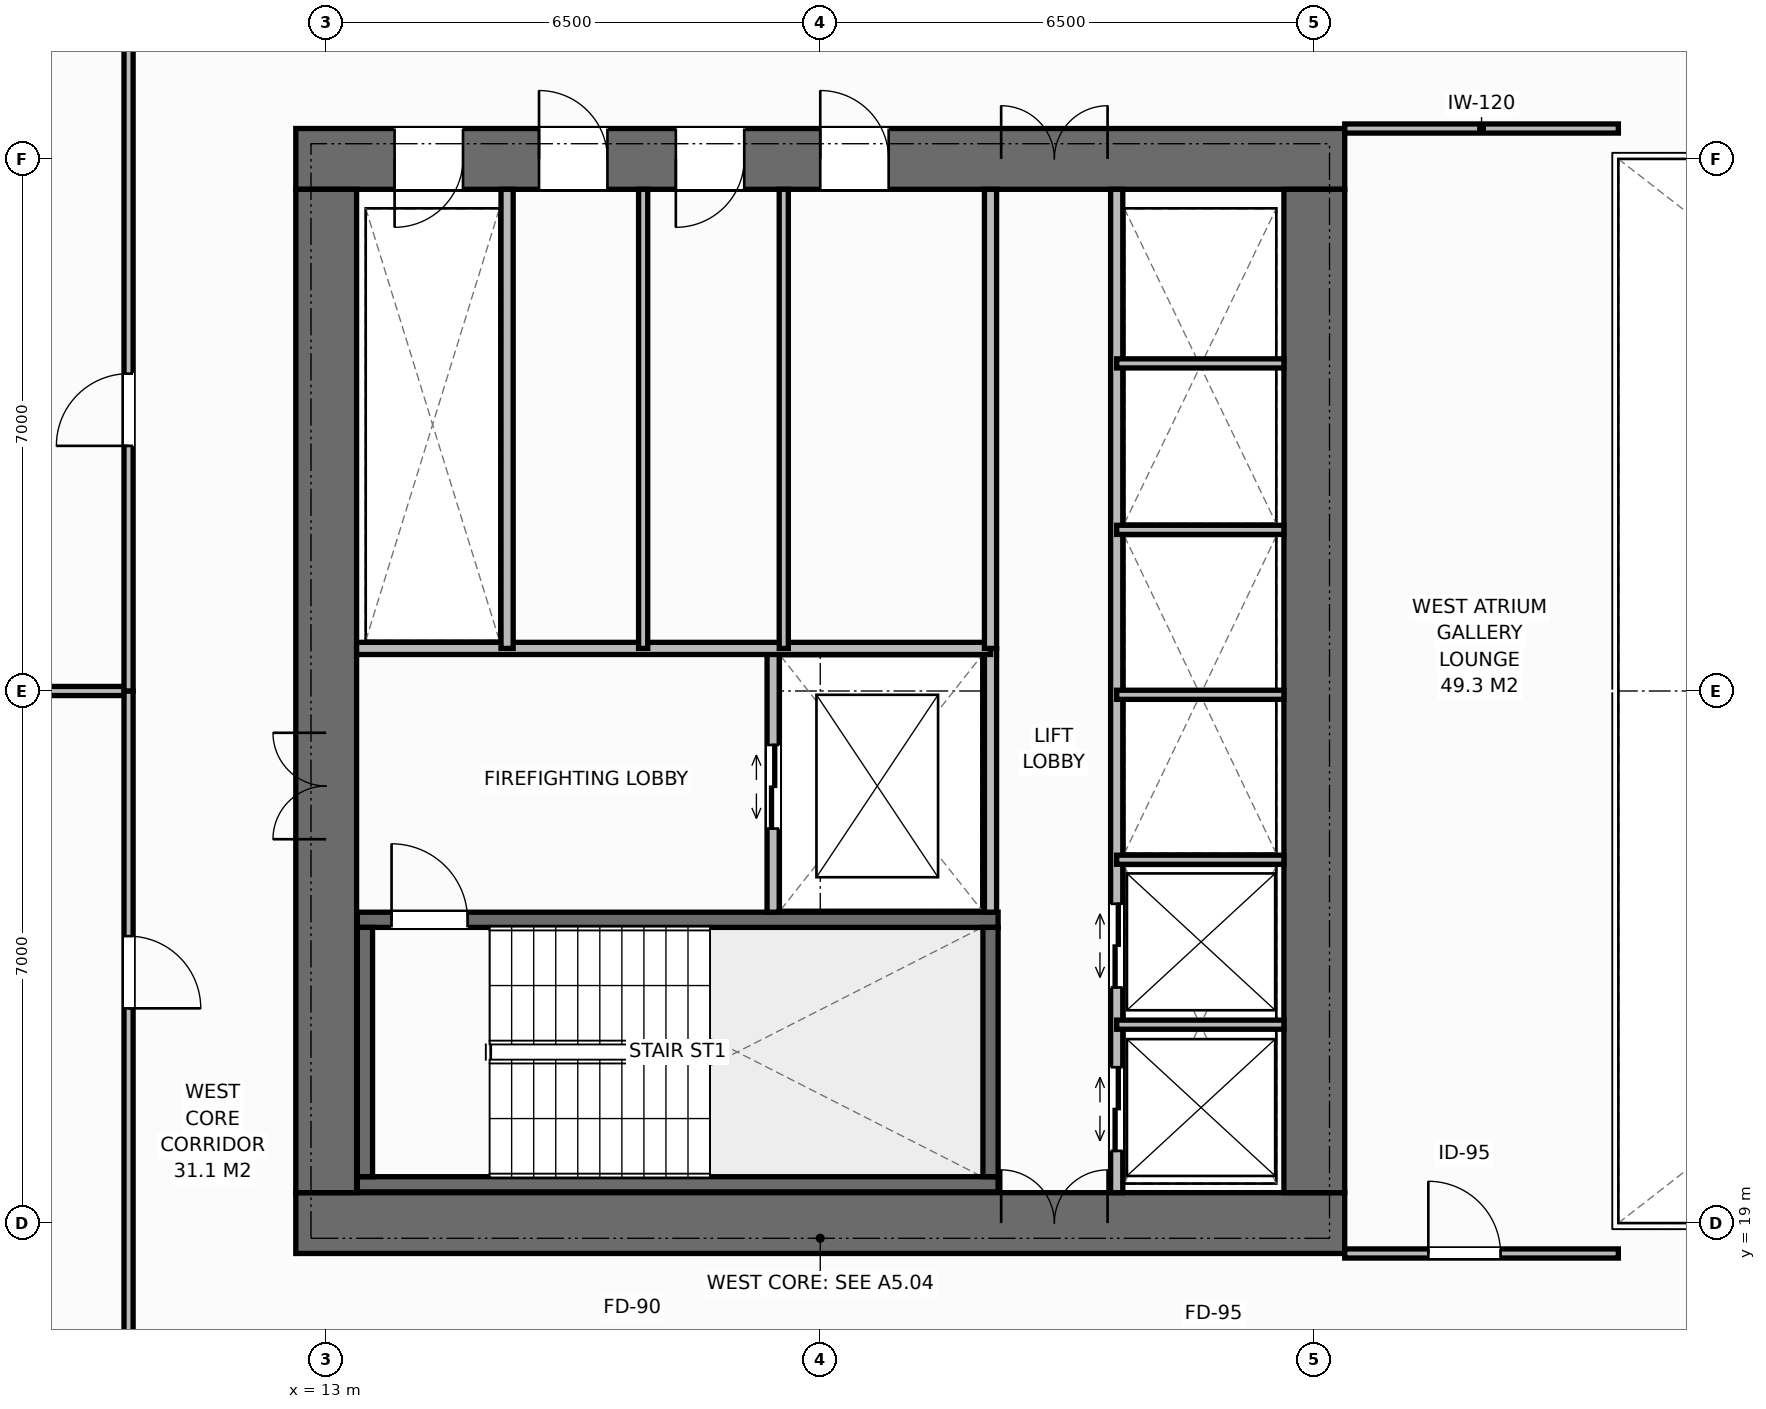
"""IFC4 building model, lengths in metres.
Left out: names, types, materials, properties, quantities, classifications, styles, units other than length and angle.
Written with IfcOpenShell. Run it as: python <this file> out.ifc"""

import sys

from ifc_helpers import new_model, si_unit, direction, frame, frame_2d, origin, place, context, subcontext, project, spatial, rectangle, extrude, element, fill, save


model = new_model("IFC4")
c1 = context("Model", 3, precision=1e-05, world=origin(), true_north=direction((0.0, 1.0)))
c2 = subcontext(c1, "Body", "Model", "MODEL_VIEW")
j1 = project(units=[si_unit("LENGTHUNIT", "METRE"), si_unit("PLANEANGLEUNIT", "RADIAN")], contexts=[c1])
p1 = place(None, origin())
s1 = spatial("IfcSite", under=j1, at=p1, CompositionType="ELEMENT")
p2 = place(p1, origin())
s2 = spatial("IfcBuilding", under=s1, at=p2, CompositionType="ELEMENT")
p3 = place(p2, frame((0.0, 0.0, 46.8)))
s3 = spatial("IfcBuildingStorey", under=s2, at=p3, CompositionType="ELEMENT", Elevation=46.8)
p4 = place(p3, frame((12.6, 19.0, 0.0), z_axis=(0.0, 0.0, 1.0), x_axis=(1.0, 0.0, 0.0)))
e1 = element("IfcWall", 1, at=p4, inside=s3, PredefinedType="SHEAR", context=c2, shape_type="SweptSolid", body=[
    extrude(rectangle(XDim=13.8, YDim=0.8, at=frame_2d((6.9, 0.0))), origin(), (0.0, 0.0, 1.0), 3.8),
])
p5 = place(p4, frame((9.28, 0.0, 0.0)))
e2 = element("IfcOpeningElement", 2, at=p5, cuts=e1, PredefinedType="OPENING", context=c2, shape_type="SweptSolid", body=[
    extrude(rectangle(XDim=1.4, YDim=2.2, at=frame_2d((0.7, 1.1))), frame((0.0, 0.41, 0.0), z_axis=(0.0, -1.0, 0.0), x_axis=(1.0, 0.0, 0.0)), (0.0, 0.0, 1.0), 0.82),
])
p6 = place(p3, frame((12.6, 33.0, 0.0), z_axis=(0.0, 0.0, 1.0), x_axis=(1.0, 0.0, 0.0)))
e3 = element("IfcWall", 3, at=p6, inside=s3, PredefinedType="SHEAR", context=c2, shape_type="SweptSolid", body=[
    extrude(rectangle(XDim=13.8, YDim=0.8, at=frame_2d((6.9, 0.0))), origin(), (0.0, 0.0, 1.0), 3.8),
])
p7 = place(p6, frame((1.3, 0.0, 0.0)))
e4 = element("IfcOpeningElement", 4, at=p7, cuts=e3, PredefinedType="OPENING", context=c2, shape_type="SweptSolid", body=[
    extrude(rectangle(XDim=0.9, YDim=2.15, at=frame_2d((0.45, 1.075))), frame((0.0, 0.41, 0.0), z_axis=(0.0, -1.0, 0.0), x_axis=(1.0, 0.0, 0.0)), (0.0, 0.0, 1.0), 0.82),
])
p8 = place(p6, frame((3.2, 0.0, 0.0)))
e5 = element("IfcOpeningElement", 5, at=p8, cuts=e3, PredefinedType="OPENING", context=c2, shape_type="SweptSolid", body=[
    extrude(rectangle(XDim=0.9, YDim=2.15, at=frame_2d((0.45, 1.075))), frame((0.0, 0.41, 0.0), z_axis=(0.0, -1.0, 0.0), x_axis=(1.0, 0.0, 0.0)), (0.0, 0.0, 1.0), 0.82),
])
p9 = place(p6, frame((5.0, 0.0, 0.0)))
e6 = element("IfcOpeningElement", 6, at=p9, cuts=e3, PredefinedType="OPENING", context=c2, shape_type="SweptSolid", body=[
    extrude(rectangle(XDim=0.9, YDim=2.15, at=frame_2d((0.45, 1.075))), frame((0.0, 0.41, 0.0), z_axis=(0.0, -1.0, 0.0), x_axis=(1.0, 0.0, 0.0)), (0.0, 0.0, 1.0), 0.82),
])
p10 = place(p6, frame((6.9, 0.0, 0.0)))
e7 = element("IfcOpeningElement", 7, at=p10, cuts=e3, PredefinedType="OPENING", context=c2, shape_type="SweptSolid", body=[
    extrude(rectangle(XDim=0.9, YDim=2.15, at=frame_2d((0.45, 1.075))), frame((0.0, 0.41, 0.0), z_axis=(0.0, -1.0, 0.0), x_axis=(1.0, 0.0, 0.0)), (0.0, 0.0, 1.0), 0.82),
])
p11 = place(p6, frame((9.28, 0.0, 0.0)))
e8 = element("IfcOpeningElement", 8, at=p11, cuts=e3, PredefinedType="OPENING", context=c2, shape_type="SweptSolid", body=[
    extrude(rectangle(XDim=1.4, YDim=2.2, at=frame_2d((0.7, 1.1))), frame((0.0, 0.41, 0.0), z_axis=(0.0, -1.0, 0.0), x_axis=(1.0, 0.0, 0.0)), (0.0, 0.0, 1.0), 0.82),
])
p12 = place(p3, frame((13.0, 19.4, 0.0), z_axis=(0.0, 0.0, 1.0), x_axis=(0.0, 1.0, 0.0)))
e9 = element("IfcWall", 9, at=p12, inside=s3, PredefinedType="SHEAR", context=c2, shape_type="SweptSolid", body=[
    extrude(rectangle(XDim=13.2, YDim=0.8, at=frame_2d((6.6, 0.0))), origin(), (0.0, 0.0, 1.0), 3.8),
])
p13 = place(p12, frame((4.65, 0.0, 0.0)))
e10 = element("IfcOpeningElement", 10, at=p13, cuts=e9, PredefinedType="OPENING", context=c2, shape_type="SweptSolid", body=[
    extrude(rectangle(XDim=1.4, YDim=2.2, at=frame_2d((0.7, 1.1))), frame((0.0, 0.41, 0.0), z_axis=(0.0, -1.0, 0.0), x_axis=(1.0, 0.0, 0.0)), (0.0, 0.0, 1.0), 0.82),
])
p14 = place(p3, frame((26.0, 19.4, 0.0), z_axis=(0.0, 0.0, 1.0), x_axis=(0.0, 1.0, 0.0)))
e11 = element("IfcWall", 11, at=p14, inside=s3, PredefinedType="SHEAR", context=c2, shape_type="SweptSolid", body=[
    extrude(rectangle(XDim=13.2, YDim=0.8, at=frame_2d((6.6, 0.0))), origin(), (0.0, 0.0, 1.0), 3.8),
])
p15 = place(p3, frame((13.41, 19.51, 0.0), z_axis=(0.0, 0.0, 1.0), x_axis=(1.0, 0.0, 0.0)))
e12 = element("IfcWall", 12, at=p15, inside=s3, PredefinedType="SHEAR", context=c2, shape_type="SweptSolid", body=[
    extrude(rectangle(XDim=8.43, YDim=0.2, at=frame_2d((4.215, 0.0))), origin(), (0.0, 0.0, 1.0), 3.8),
])
p16 = place(p3, frame((13.41, 22.99, 0.0), z_axis=(0.0, 0.0, 1.0), x_axis=(1.0, 0.0, 0.0)))
e13 = element("IfcWall", 13, at=p16, inside=s3, PredefinedType="SHEAR", context=c2, shape_type="SweptSolid", body=[
    extrude(rectangle(XDim=8.43, YDim=0.2, at=frame_2d((4.215, 0.0))), origin(), (0.0, 0.0, 1.0), 3.8),
])
p17 = place(p16, frame((0.45, 0.0, 0.0)))
e14 = element("IfcOpeningElement", 14, at=p17, cuts=e13, PredefinedType="OPENING", context=c2, shape_type="SweptSolid", body=[
    extrude(rectangle(XDim=1.0, YDim=2.15, at=frame_2d((0.5, 1.075))), frame((0.0, 0.11, 0.0), z_axis=(0.0, -1.0, 0.0), x_axis=(1.0, 0.0, 0.0)), (0.0, 0.0, 1.0), 0.22),
])
for number, where, z_axis, x_axis in (
    (15, (13.51, 19.61, 0.0), (0.0, 0.0, 1.0), (0.0, 1.0, 0.0)),
    (16, (21.74, 19.61, 0.0), (0.0, 0.0, 1.0), (0.0, 1.0, 0.0)),
):
    element("IfcWall", number, at=place(p3, frame(where, z_axis=z_axis, x_axis=x_axis)), inside=s3, PredefinedType="SHEAR", context=c2, shape_type="SweptSolid", body=[
        extrude(rectangle(XDim=3.28, YDim=0.2, at=frame_2d((1.64, 0.0))), origin(), (0.0, 0.0, 1.0), 3.8),
    ])
p18 = place(p3, frame((21.74, 23.09, 0.0), z_axis=(0.0, 0.0, 1.0), x_axis=(0.0, 1.0, 0.0)))
e17 = element("IfcWall", 17, at=p18, inside=s3, PredefinedType="STANDARD", context=c2, shape_type="SweptSolid", body=[
    extrude(rectangle(XDim=3.47, YDim=0.16, at=frame_2d((1.735, 0.0))), origin(), (0.0, 0.0, 1.0), 3.55),
])
p19 = place(p3, frame((18.88, 23.09, 0.0), z_axis=(0.0, 0.0, 1.0), x_axis=(0.0, 1.0, 0.0)))
e18 = element("IfcWall", 18, at=p19, inside=s3, PredefinedType="STANDARD", context=c2, shape_type="SweptSolid", body=[
    extrude(rectangle(XDim=3.47, YDim=0.16, at=frame_2d((1.735, 0.0))), origin(), (0.0, 0.0, 1.0), 3.55),
])
p20 = place(p19, frame((1.1, 0.0, 0.0)))
e19 = element("IfcOpeningElement", 19, at=p20, cuts=e18, PredefinedType="OPENING", context=c2, shape_type="SweptSolid", body=[
    extrude(rectangle(XDim=1.1, YDim=2.2, at=frame_2d((0.55, 1.1))), frame((0.0, 0.09, 0.0), z_axis=(0.0, -1.0, 0.0), x_axis=(1.0, 0.0, 0.0)), (0.0, 0.0, 1.0), 0.18),
])
p21 = place(p3, frame((13.4, 26.56, 0.0), z_axis=(0.0, 0.0, 1.0), x_axis=(1.0, 0.0, 0.0)))
e20 = element("IfcWall", 20, at=p21, inside=s3, PredefinedType="STANDARD", context=c2, shape_type="SweptSolid", body=[
    extrude(rectangle(XDim=8.34, YDim=0.16, at=frame_2d((4.17, 0.0))), origin(), (0.0, 0.0, 1.0), 3.55),
])
p22 = place(p3, frame((15.38, 26.56, 0.0), z_axis=(0.0, 0.0, 1.0), x_axis=(0.0, 1.0, 0.0)))
e21 = element("IfcWall", 21, at=p22, inside=s3, PredefinedType="STANDARD", context=c2, shape_type="SweptSolid", body=[
    extrude(rectangle(XDim=6.04, YDim=0.16, at=frame_2d((3.02, 0.0))), origin(), (0.0, 0.0, 1.0), 3.55),
])
for number, where, z_axis, x_axis in (
    (22, (17.17, 26.56, 0.0), (0.0, 0.0, 1.0), (0.0, 1.0, 0.0)),
    (23, (19.02, 26.56, 0.0), (0.0, 0.0, 1.0), (0.0, 1.0, 0.0)),
):
    element("IfcWall", number, at=place(p3, frame(where, z_axis=z_axis, x_axis=x_axis)), inside=s3, PredefinedType="PARTITIONING", context=c2, shape_type="SweptSolid", body=[
        extrude(rectangle(XDim=6.04, YDim=0.12, at=frame_2d((3.02, 0.0))), origin(), (0.0, 0.0, 1.0), 3.55),
    ])
p23 = place(p3, frame((21.74, 26.56, 0.0), z_axis=(0.0, 0.0, 1.0), x_axis=(0.0, 1.0, 0.0)))
e24 = element("IfcWall", 24, at=p23, inside=s3, PredefinedType="STANDARD", context=c2, shape_type="SweptSolid", body=[
    extrude(rectangle(XDim=6.04, YDim=0.16, at=frame_2d((3.02, 0.0))), origin(), (0.0, 0.0, 1.0), 3.55),
])
p24 = place(p3, frame((23.4, 19.4, 0.0), z_axis=(0.0, 0.0, 1.0), x_axis=(0.0, 1.0, 0.0)))
e25 = element("IfcWall", 25, at=p24, inside=s3, PredefinedType="STANDARD", context=c2, shape_type="SweptSolid", body=[
    extrude(rectangle(XDim=13.2, YDim=0.16, at=frame_2d((6.6, 0.0))), origin(), (0.0, 0.0, 1.0), 3.55),
])
p25 = place(p24, frame((0.55, 0.0, 0.0)))
e26 = element("IfcOpeningElement", 26, at=p25, cuts=e25, PredefinedType="OPENING", context=c2, shape_type="SweptSolid", body=[
    extrude(rectangle(XDim=1.1, YDim=2.2, at=frame_2d((0.55, 1.1))), frame((0.0, 0.09, 0.0), z_axis=(0.0, -1.0, 0.0), x_axis=(1.0, 0.0, 0.0)), (0.0, 0.0, 1.0), 0.18),
])
p26 = place(p24, frame((2.7, 0.0, 0.0)))
e27 = element("IfcOpeningElement", 27, at=p26, cuts=e25, PredefinedType="OPENING", context=c2, shape_type="SweptSolid", body=[
    extrude(rectangle(XDim=1.1, YDim=2.2, at=frame_2d((0.55, 1.1))), frame((0.0, 0.09, 0.0), z_axis=(0.0, -1.0, 0.0), x_axis=(1.0, 0.0, 0.0)), (0.0, 0.0, 1.0), 0.18),
])
for number, where, z_axis, x_axis in (
    (28, (23.4, 21.61, 0.0), (0.0, 0.0, 1.0), (1.0, 0.0, 0.0)),
    (29, (23.4, 23.78, 0.0), (0.0, 0.0, 1.0), (1.0, 0.0, 0.0)),
    (30, (23.4, 25.95, 0.0), (0.0, 0.0, 1.0), (1.0, 0.0, 0.0)),
    (31, (23.4, 28.12, 0.0), (0.0, 0.0, 1.0), (1.0, 0.0, 0.0)),
    (32, (23.4, 30.31, 0.0), (0.0, 0.0, 1.0), (1.0, 0.0, 0.0)),
):
    element("IfcWall", number, at=place(p3, frame(where, z_axis=z_axis, x_axis=x_axis)), inside=s3, PredefinedType="PARTITIONING", context=c2, shape_type="SweptSolid", body=[
        extrude(rectangle(XDim=2.2, YDim=0.12, at=frame_2d((1.1, 0.0))), origin(), (0.0, 0.0, 1.0), 3.55),
    ])
p27 = place(p3, frame((26.4, 33.4, 0.0), z_axis=(0.0, 0.0, 1.0), x_axis=(1.0, 0.0, 0.0)))
e33 = element("IfcWall", 33, at=p27, inside=s3, PredefinedType="PARTITIONING", context=c2, shape_type="SweptSolid", body=[
    extrude(rectangle(XDim=3.6, YDim=0.12, at=frame_2d((1.8, 0.0))), origin(), (0.0, 0.0, 1.0), 3.55),
])
p28 = place(p3, frame((26.4, 18.6, 0.0), z_axis=(0.0, 0.0, 1.0), x_axis=(1.0, 0.0, 0.0)))
e34 = element("IfcWall", 34, at=p28, inside=s3, PredefinedType="PARTITIONING", context=c2, shape_type="SweptSolid", body=[
    extrude(rectangle(XDim=3.6, YDim=0.12, at=frame_2d((1.8, 0.0))), origin(), (0.0, 0.0, 1.0), 3.55),
])
p29 = place(p28, frame((1.1, 0.0, 0.0)))
e35 = element("IfcOpeningElement", 35, at=p29, cuts=e34, PredefinedType="OPENING", context=c2, shape_type="SweptSolid", body=[
    extrude(rectangle(XDim=0.95, YDim=2.15, at=frame_2d((0.475, 1.075))), frame((0.0, 0.07, 0.0), z_axis=(0.0, -1.0, 0.0), x_axis=(1.0, 0.0, 0.0)), (0.0, 0.0, 1.0), 0.14),
])
p30 = place(p3, frame((-0.18, 26.0, 0.0), z_axis=(0.0, 0.0, 1.0), x_axis=(1.0, 0.0, 0.0)))
e36 = element("IfcWall", 36, at=p30, inside=s3, PredefinedType="PARTITIONING", context=c2, shape_type="SweptSolid", body=[
    extrude(rectangle(XDim=10.58, YDim=0.12, at=frame_2d((5.29, 0.0))), origin(), (0.0, 0.0, 1.0), 3.55),
])
p31 = place(p3, frame((10.4, 16.5, 0.0), z_axis=(0.0, 0.0, 1.0), x_axis=(0.0, 1.0, 0.0)))
e37 = element("IfcWall", 37, at=p31, inside=s3, PredefinedType="PARTITIONING", context=c2, shape_type="SweptSolid", body=[
    extrude(rectangle(XDim=9.5, YDim=0.12, at=frame_2d((4.75, 0.0))), origin(), (0.0, 0.0, 1.0), 3.55),
])
p32 = place(p31, frame((5.325, 0.0, 0.0)))
e38 = element("IfcOpeningElement", 38, at=p32, cuts=e37, PredefinedType="OPENING", context=c2, shape_type="SweptSolid", body=[
    extrude(rectangle(XDim=0.95, YDim=2.15, at=frame_2d((0.475, 1.075))), frame((0.0, 0.07, 0.0), z_axis=(0.0, -1.0, 0.0), x_axis=(1.0, 0.0, 0.0)), (0.0, 0.0, 1.0), 0.14),
])
p33 = place(p3, frame((10.4, 26.0, 0.0), z_axis=(0.0, 0.0, 1.0), x_axis=(0.0, 1.0, 0.0)))
e39 = element("IfcWall", 39, at=p33, inside=s3, PredefinedType="PARTITIONING", context=c2, shape_type="SweptSolid", body=[
    extrude(rectangle(XDim=9.5, YDim=0.12, at=frame_2d((4.75, 0.0))), origin(), (0.0, 0.0, 1.0), 3.55),
])
p34 = place(p33, frame((3.225, 0.0, 0.0)))
e40 = element("IfcOpeningElement", 40, at=p34, cuts=e39, PredefinedType="OPENING", context=c2, shape_type="SweptSolid", body=[
    extrude(rectangle(XDim=0.95, YDim=2.15, at=frame_2d((0.475, 1.075))), frame((0.0, 0.07, 0.0), z_axis=(0.0, -1.0, 0.0), x_axis=(1.0, 0.0, 0.0)), (0.0, 0.0, 1.0), 0.14),
])
p35 = place(p17, origin())
e41 = element("IfcDoor", 41, at=p35, inside=s3, OperationType="SINGLE_SWING_LEFT", PredefinedType="DOOR", context=c2, shape_type="SweptSolid", body=[
    extrude(rectangle(XDim=1.0, YDim=2.15, at=frame_2d((0.5, 1.075))), frame((0.0, 0.025, 0.0), z_axis=(0.0, -1.0, 0.0), x_axis=(1.0, 0.0, 0.0)), (0.0, 0.0, 1.0), 0.05),
])
fill(e14, e41)
p36 = place(p13, origin())
e42 = element("IfcDoor", 42, at=p36, inside=s3, OperationType="DOUBLE_DOOR_SINGLE_SWING", PredefinedType="DOOR", context=c2, shape_type="SweptSolid", body=[
    extrude(rectangle(XDim=1.4, YDim=2.2, at=frame_2d((0.7, 1.1))), frame((0.0, 0.025, 0.0), z_axis=(0.0, -1.0, 0.0), x_axis=(1.0, 0.0, 0.0)), (0.0, 0.0, 1.0), 0.05),
])
fill(e10, e42)
p37 = place(p20, origin())
e43 = element("IfcDoor", 43, at=p37, inside=s3, OperationType="DOUBLE_DOOR_SLIDING", PredefinedType="DOOR", context=c2, shape_type="SweptSolid", body=[
    extrude(rectangle(XDim=1.1, YDim=2.2, at=frame_2d((0.55, 1.1))), frame((0.0, 0.025, 0.0), z_axis=(0.0, -1.0, 0.0), x_axis=(1.0, 0.0, 0.0)), (0.0, 0.0, 1.0), 0.05),
])
fill(e19, e43)
p38 = place(p7, origin())
e44 = element("IfcDoor", 44, at=p38, inside=s3, OperationType="SINGLE_SWING_RIGHT", PredefinedType="DOOR", context=c2, shape_type="SweptSolid", body=[
    extrude(rectangle(XDim=0.9, YDim=2.15, at=frame_2d((0.45, 1.075))), frame((0.0, -0.075, 0.0), z_axis=(0.0, -1.0, 0.0), x_axis=(1.0, 0.0, 0.0)), (0.0, 0.0, 1.0), 0.05),
])
fill(e4, e44)
p39 = place(p8, origin())
e45 = element("IfcDoor", 45, at=p39, inside=s3, OperationType="SINGLE_SWING_LEFT", PredefinedType="DOOR", context=c2, shape_type="SweptSolid", body=[
    extrude(rectangle(XDim=0.9, YDim=2.15, at=frame_2d((0.45, 1.075))), frame((0.0, -0.075, 0.0), z_axis=(0.0, -1.0, 0.0), x_axis=(1.0, 0.0, 0.0)), (0.0, 0.0, 1.0), 0.05),
])
fill(e5, e45)
p40 = place(p9, origin())
e46 = element("IfcDoor", 46, at=p40, inside=s3, OperationType="SINGLE_SWING_RIGHT", PredefinedType="DOOR", context=c2, shape_type="SweptSolid", body=[
    extrude(rectangle(XDim=0.9, YDim=2.15, at=frame_2d((0.45, 1.075))), frame((0.0, -0.075, 0.0), z_axis=(0.0, -1.0, 0.0), x_axis=(1.0, 0.0, 0.0)), (0.0, 0.0, 1.0), 0.05),
])
fill(e6, e46)
p41 = place(p10, origin())
e47 = element("IfcDoor", 47, at=p41, inside=s3, OperationType="SINGLE_SWING_LEFT", PredefinedType="DOOR", context=c2, shape_type="SweptSolid", body=[
    extrude(rectangle(XDim=0.9, YDim=2.15, at=frame_2d((0.45, 1.075))), frame((0.0, -0.075, 0.0), z_axis=(0.0, -1.0, 0.0), x_axis=(1.0, 0.0, 0.0)), (0.0, 0.0, 1.0), 0.05),
])
fill(e7, e47)
p42 = place(p5, origin())
e48 = element("IfcDoor", 48, at=p42, inside=s3, OperationType="DOUBLE_DOOR_SINGLE_SWING", PredefinedType="DOOR", context=c2, shape_type="SweptSolid", body=[
    extrude(rectangle(XDim=1.4, YDim=2.2, at=frame_2d((0.7, 1.1))), frame((0.0, 0.125, 0.0), z_axis=(0.0, -1.0, 0.0), x_axis=(1.0, 0.0, 0.0)), (0.0, 0.0, 1.0), 0.05),
])
fill(e2, e48)
p43 = place(p11, origin())
e49 = element("IfcDoor", 49, at=p43, inside=s3, OperationType="DOUBLE_DOOR_SINGLE_SWING", PredefinedType="DOOR", context=c2, shape_type="SweptSolid", body=[
    extrude(rectangle(XDim=1.4, YDim=2.2, at=frame_2d((0.7, 1.1))), frame((0.0, -0.075, 0.0), z_axis=(0.0, -1.0, 0.0), x_axis=(1.0, 0.0, 0.0)), (0.0, 0.0, 1.0), 0.05),
])
fill(e8, e49)
p44 = place(p25, origin())
e50 = element("IfcDoor", 50, at=p44, inside=s3, OperationType="DOUBLE_DOOR_SLIDING", PredefinedType="DOOR", context=c2, shape_type="SweptSolid", body=[
    extrude(rectangle(XDim=1.1, YDim=2.2, at=frame_2d((0.55, 1.1))), frame((0.0, 0.025, 0.0), z_axis=(0.0, -1.0, 0.0), x_axis=(1.0, 0.0, 0.0)), (0.0, 0.0, 1.0), 0.05),
])
fill(e26, e50)
p45 = place(p26, origin())
e51 = element("IfcDoor", 51, at=p45, inside=s3, OperationType="DOUBLE_DOOR_SLIDING", PredefinedType="DOOR", context=c2, shape_type="SweptSolid", body=[
    extrude(rectangle(XDim=1.1, YDim=2.2, at=frame_2d((0.55, 1.1))), frame((0.0, 0.025, 0.0), z_axis=(0.0, -1.0, 0.0), x_axis=(1.0, 0.0, 0.0)), (0.0, 0.0, 1.0), 0.05),
])
fill(e27, e51)
p46 = place(p29, origin())
e52 = element("IfcDoor", 52, at=p46, inside=s3, OperationType="SINGLE_SWING_LEFT", PredefinedType="DOOR", context=c2, shape_type="SweptSolid", body=[
    extrude(rectangle(XDim=0.95, YDim=2.15, at=frame_2d((0.475, 1.075))), frame((0.0, 0.025, 0.0), z_axis=(0.0, -1.0, 0.0), x_axis=(1.0, 0.0, 0.0)), (0.0, 0.0, 1.0), 0.05),
])
fill(e35, e52)
p47 = place(p32, origin())
e53 = element("IfcDoor", 53, at=p47, inside=s3, OperationType="SINGLE_SWING_RIGHT", PredefinedType="DOOR", context=c2, shape_type="SweptSolid", body=[
    extrude(rectangle(XDim=0.95, YDim=2.15, at=frame_2d((0.475, 1.075))), frame((0.0, 0.025, 0.0), z_axis=(0.0, -1.0, 0.0), x_axis=(1.0, 0.0, 0.0)), (0.0, 0.0, 1.0), 0.05),
])
fill(e38, e53)
p48 = place(p34, origin())
e54 = element("IfcDoor", 54, at=p48, inside=s3, OperationType="SINGLE_SWING_LEFT", PredefinedType="DOOR", context=c2, shape_type="SweptSolid", body=[
    extrude(rectangle(XDim=0.95, YDim=2.15, at=frame_2d((0.475, 1.075))), frame((0.0, 0.025, 0.0), z_axis=(0.0, -1.0, 0.0), x_axis=(1.0, 0.0, 0.0)), (0.0, 0.0, 1.0), 0.05),
])
fill(e40, e54)
save(model, sys.argv[1])
